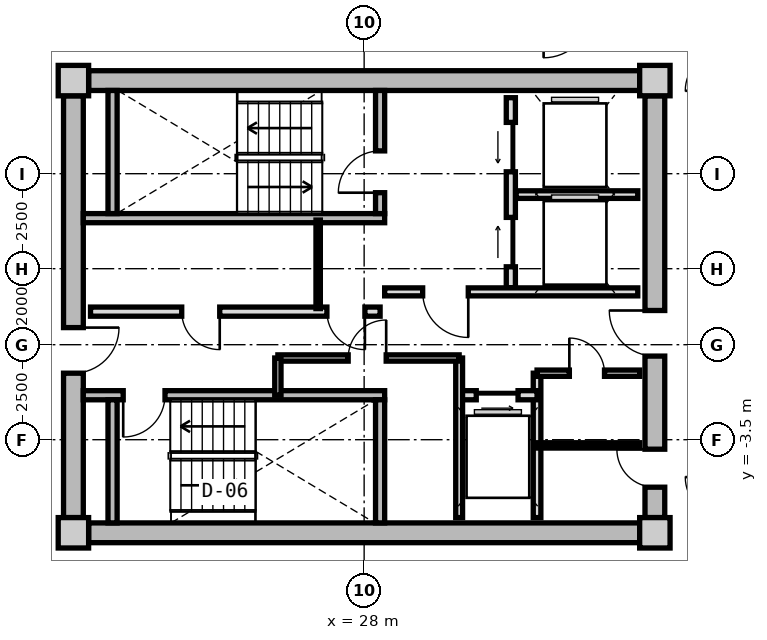
"""IFC4 building model, lengths in metres.
Left out: names, types, materials, properties, quantities, classifications, styles, units other than length and angle.
Written with IfcOpenShell. Run it as: python <this file> out.ifc"""

import sys

from ifc_helpers import new_model, si_unit, direction, frame, frame_2d, origin, origin_2d, place, context, subcontext, project, spatial, rectangle, extrude, source, transform, mapped, element, fill, save


model = new_model("IFC4")
c1 = context("Model", 3, precision=1e-05, world=origin(), true_north=direction((0.0, 1.0)))
c2 = subcontext(c1, "Body", "Model", "MODEL_VIEW")
j1 = project(units=[si_unit("LENGTHUNIT", "METRE"), si_unit("PLANEANGLEUNIT", "RADIAN")], contexts=[c1])
p1 = place(None, origin())
s1 = spatial("IfcSite", under=j1, at=p1, CompositionType="ELEMENT")
p2 = place(p1, origin())
s2 = spatial("IfcBuilding", under=s1, at=p2, CompositionType="ELEMENT")
p3 = place(p2, frame((0.0, 0.0, 207.8)))
s3 = spatial("IfcBuildingStorey", under=s2, at=p3, CompositionType="ELEMENT", Elevation=207.8)
m1 = source(origin(), c2, "Body", "SweptSolid", [
    extrude(rectangle(XDim=0.8, YDim=0.8, at=origin_2d()), origin(), (0.0, 0.0, 1.0), 3.05),
])
for number, where, z_axis, x_axis in (
    (1, (20.35, -5.95, 0.0), (0.0, 0.0, 1.0), (1.0, 0.0, 0.0)),
    (2, (35.65, -5.95, 0.0), (0.0, 0.0, 1.0), (1.0, 0.0, 0.0)),
    (3, (35.65, 5.95, 0.0), (0.0, 0.0, 1.0), (1.0, 0.0, 0.0)),
    (4, (20.35, 5.95, 0.0), (0.0, 0.0, 1.0), (1.0, 0.0, 0.0)),
):
    element("IfcColumn", number, at=place(p3, frame(where, z_axis=z_axis, x_axis=x_axis)), inside=s3, PredefinedType="COLUMN", context=c2, shape_type="MappedRepresentation", body=[
        mapped(m1, transform((0.0, 0.0, 0.0), x_axis=(1.0, 0.0, 0.0), y_axis=(0.0, 1.0, 0.0), z_axis=(0.0, 0.0, 1.0), scale=1.0)),
    ])
m2 = source(origin(), c2, "Body", "SweptSolid", [
    extrude(rectangle(XDim=14.5, YDim=0.52, at=frame_2d((7.25, 0.0))), origin(), (0.0, 0.0, 1.0), 2.76),
])
for number, where, z_axis, x_axis in (
    (5, (20.75, 5.95, 0.0), (0.0, 0.0, 1.0), (1.0, 0.0, 0.0)),
    (6, (35.25, -5.95, 0.0), (0.0, 0.0, 1.0), (-1.0, 0.0, 0.0)),
):
    element("IfcWall", number, at=place(p3, frame(where, z_axis=z_axis, x_axis=x_axis)), inside=s3, PredefinedType="SHEAR", context=c2, shape_type="MappedRepresentation", body=[
        mapped(m2, transform((0.0, 0.0, 0.0), x_axis=(1.0, 0.0, 0.0), y_axis=(0.0, 1.0, 0.0), z_axis=(0.0, 0.0, 1.0), scale=1.0)),
    ])
m3 = source(origin(), c2, "Body", "SweptSolid", [
    extrude(rectangle(XDim=11.1, YDim=0.52, at=frame_2d((5.55, 0.0))), origin(), (0.0, 0.0, 1.0), 2.76),
])
p4 = place(p3, frame((20.35, -5.55, 0.0), z_axis=(0.0, 0.0, 1.0), x_axis=(0.0, 1.0, 0.0)))
e7 = element("IfcWall", 7, at=p4, inside=s3, PredefinedType="SHEAR", context=c2, shape_type="MappedRepresentation", body=[
    mapped(m3, transform((0.0, 0.0, 0.0), x_axis=(1.0, 0.0, 0.0), y_axis=(0.0, 1.0, 0.0), z_axis=(0.0, 0.0, 1.0), scale=1.0)),
])
p5 = place(p4, frame((3.8, 0.0, 0.0)))
e8 = element("IfcOpeningElement", 8, at=p5, cuts=e7, PredefinedType="OPENING", context=c2, shape_type="SweptSolid", body=[
    extrude(rectangle(XDim=1.2, YDim=2.15, at=frame_2d((0.6, 1.075))), frame((0.0, 0.27, 0.0), z_axis=(0.0, -1.0, 0.0), x_axis=(1.0, 0.0, 0.0)), (0.0, 0.0, 1.0), 0.54),
])
p6 = place(p3, frame((35.65, 5.55, 0.0), z_axis=(0.0, 0.0, 1.0), x_axis=(0.0, -1.0, 0.0)))
e9 = element("IfcWall", 9, at=p6, inside=s3, PredefinedType="SHEAR", context=c2, shape_type="MappedRepresentation", body=[
    mapped(m3, transform((0.0, 0.0, 0.0), x_axis=(1.0, 0.0, 0.0), y_axis=(0.0, 1.0, 0.0), z_axis=(0.0, 0.0, 1.0), scale=1.0)),
])
p7 = place(p6, frame((5.65, 0.0, 0.0)))
e10 = element("IfcOpeningElement", 10, at=p7, cuts=e9, PredefinedType="OPENING", context=c2, shape_type="SweptSolid", body=[
    extrude(rectangle(XDim=1.2, YDim=2.15, at=frame_2d((0.6, 1.075))), frame((0.0, 0.27, 0.0), z_axis=(0.0, -1.0, 0.0), x_axis=(1.0, 0.0, 0.0)), (0.0, 0.0, 1.0), 0.54),
])
p8 = place(p6, frame((9.3, 0.0, 0.0)))
e11 = element("IfcOpeningElement", 11, at=p8, cuts=e9, PredefinedType="OPENING", context=c2, shape_type="SweptSolid", body=[
    extrude(rectangle(XDim=1.0, YDim=2.1, at=frame_2d((0.5, 1.05))), frame((0.0, 0.27, 0.0), z_axis=(0.0, -1.0, 0.0), x_axis=(1.0, 0.0, 0.0)), (0.0, 0.0, 1.0), 0.54),
])
m4 = source(origin(), c2, "Body", "SweptSolid", [
    extrude(rectangle(XDim=7.93, YDim=0.24, at=frame_2d((3.965, 0.0))), origin(), (0.0, 0.0, 1.0), 2.76),
])
p9 = place(p3, frame((20.61, 2.33, 0.0), z_axis=(0.0, 0.0, 1.0), x_axis=(1.0, 0.0, 0.0)))
e12 = element("IfcWall", 12, at=p9, inside=s3, PredefinedType="PARTITIONING", context=c2, shape_type="MappedRepresentation", body=[
    mapped(m4, transform((0.0, 0.0, 0.0), x_axis=(1.0, 0.0, 0.0), y_axis=(0.0, 1.0, 0.0), z_axis=(0.0, 0.0, 1.0), scale=1.0)),
])
m5 = source(origin(), c2, "Body", "SweptSolid", [
    extrude(rectangle(XDim=3.24, YDim=0.24, at=frame_2d((1.62, 0.0))), origin(), (0.0, 0.0, 1.0), 2.76),
])
p10 = place(p3, frame((21.38, 2.45, 0.0), z_axis=(0.0, 0.0, 1.0), x_axis=(0.0, 1.0, 0.0)))
e13 = element("IfcWall", 13, at=p10, inside=s3, PredefinedType="PARTITIONING", context=c2, shape_type="MappedRepresentation", body=[
    mapped(m5, transform((0.0, 0.0, 0.0), x_axis=(1.0, 0.0, 0.0), y_axis=(0.0, 1.0, 0.0), z_axis=(0.0, 0.0, 1.0), scale=1.0)),
])
p11 = place(p3, frame((28.42, 2.45, 0.0), z_axis=(0.0, 0.0, 1.0), x_axis=(0.0, 1.0, 0.0)))
e14 = element("IfcWall", 14, at=p11, inside=s3, PredefinedType="PARTITIONING", context=c2, shape_type="MappedRepresentation", body=[
    mapped(m5, transform((0.0, 0.0, 0.0), x_axis=(1.0, 0.0, 0.0), y_axis=(0.0, 1.0, 0.0), z_axis=(0.0, 0.0, 1.0), scale=1.0)),
])
p12 = place(p11, frame((0.55, 0.0, 0.0)))
e15 = element("IfcOpeningElement", 15, at=p12, cuts=e14, PredefinedType="OPENING", context=c2, shape_type="SweptSolid", body=[
    extrude(rectangle(XDim=1.1, YDim=2.15, at=frame_2d((0.55, 1.075))), frame((0.0, 0.13, 0.0), z_axis=(0.0, -1.0, 0.0), x_axis=(1.0, 0.0, 0.0)), (0.0, 0.0, 1.0), 0.26),
])
p13 = place(p3, frame((20.61, -2.33, 0.0), z_axis=(0.0, 0.0, 1.0), x_axis=(1.0, 0.0, 0.0)))
e16 = element("IfcWall", 16, at=p13, inside=s3, PredefinedType="PARTITIONING", context=c2, shape_type="MappedRepresentation", body=[
    mapped(m4, transform((0.0, 0.0, 0.0), x_axis=(1.0, 0.0, 0.0), y_axis=(0.0, 1.0, 0.0), z_axis=(0.0, 0.0, 1.0), scale=1.0)),
])
p14 = place(p13, frame((1.05, 0.0, 0.0)))
e17 = element("IfcOpeningElement", 17, at=p14, cuts=e16, PredefinedType="OPENING", context=c2, shape_type="SweptSolid", body=[
    extrude(rectangle(XDim=1.1, YDim=2.15, at=frame_2d((0.55, 1.075))), frame((0.0, 0.13, 0.0), z_axis=(0.0, -1.0, 0.0), x_axis=(1.0, 0.0, 0.0)), (0.0, 0.0, 1.0), 0.26),
])
for number, where, z_axis, x_axis in (
    (18, (21.38, -5.69, 0.0), (0.0, 0.0, 1.0), (0.0, 1.0, 0.0)),
    (19, (28.42, -5.69, 0.0), (0.0, 0.0, 1.0), (0.0, 1.0, 0.0)),
):
    element("IfcWall", number, at=place(p3, frame(where, z_axis=z_axis, x_axis=x_axis)), inside=s3, PredefinedType="PARTITIONING", context=c2, shape_type="MappedRepresentation", body=[
        mapped(m5, transform((0.0, 0.0, 0.0), x_axis=(1.0, 0.0, 0.0), y_axis=(0.0, 1.0, 0.0), z_axis=(0.0, 0.0, 1.0), scale=1.0)),
    ])
m6 = source(origin(), c2, "Body", "SweptSolid", [
    extrude(rectangle(XDim=5.0, YDim=0.24, at=frame_2d((2.5, 0.0))), origin(), (0.0, 0.0, 1.0), 2.745),
])
p15 = place(p3, frame((31.86, 0.5, 0.0), z_axis=(0.0, 0.0, 1.0), x_axis=(0.0, 1.0, 0.0)))
e20 = element("IfcWall", 20, at=p15, inside=s3, PredefinedType="PARTITIONING", context=c2, shape_type="MappedRepresentation", body=[
    mapped(m6, transform((0.0, 0.0, 0.0), x_axis=(1.0, 0.0, 0.0), y_axis=(0.0, 1.0, 0.0), z_axis=(0.0, 0.0, 1.0), scale=1.0)),
])
p16 = place(p15, frame((3.05, 0.0, 0.0)))
e21 = element("IfcOpeningElement", 21, at=p16, cuts=e20, PredefinedType="OPENING", context=c2, shape_type="SweptSolid", body=[
    extrude(rectangle(XDim=1.3, YDim=2.2, at=frame_2d((0.65, 1.1))), frame((0.0, 0.13, 0.0), z_axis=(0.0, -1.0, 0.0), x_axis=(1.0, 0.0, 0.0)), (0.0, 0.0, 1.0), 0.26),
])
p17 = place(p15, frame((0.55, 0.0, 0.0)))
e22 = element("IfcOpeningElement", 22, at=p17, cuts=e20, PredefinedType="OPENING", context=c2, shape_type="SweptSolid", body=[
    extrude(rectangle(XDim=1.3, YDim=2.2, at=frame_2d((0.65, 1.1))), frame((0.0, 0.13, 0.0), z_axis=(0.0, -1.0, 0.0), x_axis=(1.0, 0.0, 0.0)), (0.0, 0.0, 1.0), 0.26),
])
m7 = source(origin(), c2, "Body", "SweptSolid", [
    extrude(rectangle(XDim=3.2, YDim=0.2, at=frame_2d((1.6, 0.0))), origin(), (0.0, 0.0, 1.0), 2.745),
])
p18 = place(p3, frame((32.0, 2.95, 0.0), z_axis=(0.0, 0.0, 1.0), x_axis=(1.0, 0.0, 0.0)))
e23 = element("IfcWall", 23, at=p18, inside=s3, PredefinedType="PARTITIONING", context=c2, shape_type="MappedRepresentation", body=[
    mapped(m7, transform((0.0, 0.0, 0.0), x_axis=(1.0, 0.0, 0.0), y_axis=(0.0, 1.0, 0.0), z_axis=(0.0, 0.0, 1.0), scale=1.0)),
])
m8 = source(origin(), c2, "Body", "SweptSolid", [
    extrude(rectangle(XDim=6.66, YDim=0.21, at=frame_2d((3.33, 0.0))), origin(), (0.0, 0.0, 1.0), 2.745),
])
p19 = place(p3, frame((28.54, 0.39, 0.0), z_axis=(0.0, 0.0, 1.0), x_axis=(1.0, 0.0, 0.0)))
e24 = element("IfcWall", 24, at=p19, inside=s3, PredefinedType="PARTITIONING", context=c2, shape_type="MappedRepresentation", body=[
    mapped(m8, transform((0.0, 0.0, 0.0), x_axis=(1.0, 0.0, 0.0), y_axis=(0.0, 1.0, 0.0), z_axis=(0.0, 0.0, 1.0), scale=1.0)),
])
p20 = place(p19, frame((1.0, 0.0, 0.0)))
e25 = element("IfcOpeningElement", 25, at=p20, cuts=e24, PredefinedType="OPENING", context=c2, shape_type="SweptSolid", body=[
    extrude(rectangle(XDim=1.2, YDim=2.15, at=frame_2d((0.6, 1.075))), frame((0.0, 0.115, 0.0), z_axis=(0.0, -1.0, 0.0), x_axis=(1.0, 0.0, 0.0)), (0.0, 0.0, 1.0), 0.23),
])
m9 = source(origin(), c2, "Body", "SweptSolid", [
    extrude(rectangle(XDim=7.62, YDim=0.24, at=frame_2d((3.81, 0.0))), origin(), (0.0, 0.0, 1.0), 2.745),
])
p21 = place(p3, frame((20.8, -0.13, 0.0), z_axis=(0.0, 0.0, 1.0), x_axis=(1.0, 0.0, 0.0)))
e26 = element("IfcWall", 26, at=p21, inside=s3, PredefinedType="PARTITIONING", context=c2, shape_type="MappedRepresentation", body=[
    mapped(m9, transform((0.0, 0.0, 0.0), x_axis=(1.0, 0.0, 0.0), y_axis=(0.0, 1.0, 0.0), z_axis=(0.0, 0.0, 1.0), scale=1.0)),
])
p22 = place(p21, frame((6.22, 0.0, 0.0)))
e27 = element("IfcOpeningElement", 27, at=p22, cuts=e26, PredefinedType="OPENING", context=c2, shape_type="SweptSolid", body=[
    extrude(rectangle(XDim=1.0, YDim=2.1, at=frame_2d((0.5, 1.05))), frame((0.0, 0.13, 0.0), z_axis=(0.0, -1.0, 0.0), x_axis=(1.0, 0.0, 0.0)), (0.0, 0.0, 1.0), 0.26),
])
p23 = place(p21, frame((2.4, 0.0, 0.0)))
e28 = element("IfcOpeningElement", 28, at=p23, cuts=e26, PredefinedType="OPENING", context=c2, shape_type="SweptSolid", body=[
    extrude(rectangle(XDim=1.0, YDim=2.1, at=frame_2d((0.5, 1.05))), frame((0.0, 0.13, 0.0), z_axis=(0.0, -1.0, 0.0), x_axis=(1.0, 0.0, 0.0)), (0.0, 0.0, 1.0), 0.26),
])
m10 = source(origin(), c2, "Body", "SweptSolid", [
    extrude(rectangle(XDim=2.33, YDim=0.115, at=frame_2d((1.165, 0.0))), origin(), (0.0, 0.0, 1.0), 2.745),
])
p24 = place(p3, frame((26.79, -0.05, 0.0), z_axis=(0.0, 0.0, 1.0), x_axis=(0.0, 1.0, 0.0)))
e29 = element("IfcWall", 29, at=p24, inside=s3, PredefinedType="PARTITIONING", context=c2, shape_type="MappedRepresentation", body=[
    mapped(m10, transform((0.0, 0.0, 0.0), x_axis=(1.0, 0.0, 0.0), y_axis=(0.0, 1.0, 0.0), z_axis=(0.0, 0.0, 1.0), scale=1.0)),
])
m11 = source(origin(), c2, "Body", "SweptSolid", [
    extrude(rectangle(XDim=3.8, YDim=0.2, at=frame_2d((1.9, 0.0))), origin(), (0.0, 0.0, 1.0), 2.745),
])
p25 = place(p3, frame((32.55, -5.55, 0.0), z_axis=(0.0, 0.0, 1.0), x_axis=(0.0, 1.0, 0.0)))
e30 = element("IfcWall", 30, at=p25, inside=s3, PredefinedType="PARTITIONING", context=c2, shape_type="MappedRepresentation", body=[
    mapped(m11, transform((0.0, 0.0, 0.0), x_axis=(1.0, 0.0, 0.0), y_axis=(0.0, 1.0, 0.0), z_axis=(0.0, 0.0, 1.0), scale=1.0)),
])
m12 = source(origin(), c2, "Body", "SweptSolid", [
    extrude(rectangle(XDim=2.05, YDim=0.24, at=frame_2d((1.025, 0.0))), origin(), (0.0, 0.0, 1.0), 2.745),
])
p26 = place(p3, frame((30.5, -2.33, 0.0), z_axis=(0.0, 0.0, 1.0), x_axis=(1.0, 0.0, 0.0)))
e31 = element("IfcWall", 31, at=p26, inside=s3, PredefinedType="PARTITIONING", context=c2, shape_type="MappedRepresentation", body=[
    mapped(m12, transform((0.0, 0.0, 0.0), x_axis=(1.0, 0.0, 0.0), y_axis=(0.0, 1.0, 0.0), z_axis=(0.0, 0.0, 1.0), scale=1.0)),
])
p27 = place(p26, frame((0.45, 0.0, 0.0)))
e32 = element("IfcOpeningElement", 32, at=p27, cuts=e31, PredefinedType="OPENING", context=c2, shape_type="SweptSolid", body=[
    extrude(rectangle(XDim=1.1, YDim=2.2, at=frame_2d((0.55, 1.1))), frame((0.0, 0.13, 0.0), z_axis=(0.0, -1.0, 0.0), x_axis=(1.0, 0.0, 0.0)), (0.0, 0.0, 1.0), 0.26),
])
m13 = source(origin(), c2, "Body", "SweptSolid", [
    extrude(rectangle(XDim=4.2, YDim=0.18, at=frame_2d((2.1, 0.0))), origin(), (0.0, 0.0, 1.0), 2.745),
])
p28 = place(p3, frame((30.5, -5.55, 0.0), z_axis=(0.0, 0.0, 1.0), x_axis=(0.0, 1.0, 0.0)))
e33 = element("IfcWall", 33, at=p28, inside=s3, PredefinedType="PARTITIONING", context=c2, shape_type="MappedRepresentation", body=[
    mapped(m13, transform((0.0, 0.0, 0.0), x_axis=(1.0, 0.0, 0.0), y_axis=(0.0, 1.0, 0.0), z_axis=(0.0, 0.0, 1.0), scale=1.0)),
])
m14 = source(origin(), c2, "Body", "SweptSolid", [
    extrude(rectangle(XDim=4.77, YDim=0.165, at=frame_2d((2.385, 0.0))), origin(), (0.0, 0.0, 1.0), 2.745),
])
p29 = place(p3, frame((25.73, -1.35, 0.0), z_axis=(0.0, 0.0, 1.0), x_axis=(1.0, 0.0, 0.0)))
e34 = element("IfcWall", 34, at=p29, inside=s3, PredefinedType="PARTITIONING", context=c2, shape_type="MappedRepresentation", body=[
    mapped(m14, transform((0.0, 0.0, 0.0), x_axis=(1.0, 0.0, 0.0), y_axis=(0.0, 1.0, 0.0), z_axis=(0.0, 0.0, 1.0), scale=1.0)),
])
p30 = place(p29, frame((1.85, 0.0, 0.0)))
e35 = element("IfcOpeningElement", 35, at=p30, cuts=e34, PredefinedType="OPENING", context=c2, shape_type="SweptSolid", body=[
    extrude(rectangle(XDim=1.0, YDim=2.1, at=frame_2d((0.5, 1.05))), frame((0.0, 0.093, 0.0), z_axis=(0.0, -1.0, 0.0), x_axis=(1.0, 0.0, 0.0)), (0.0, 0.0, 1.0), 0.185),
])
m15 = source(origin(), c2, "Body", "SweptSolid", [
    extrude(rectangle(XDim=0.98, YDim=0.165, at=frame_2d((0.49, 0.0))), origin(), (0.0, 0.0, 1.0), 2.745),
])
p31 = place(p3, frame((25.73, -2.33, 0.0), z_axis=(0.0, 0.0, 1.0), x_axis=(0.0, 1.0, 0.0)))
e36 = element("IfcWall", 36, at=p31, inside=s3, PredefinedType="PARTITIONING", context=c2, shape_type="MappedRepresentation", body=[
    mapped(m15, transform((0.0, 0.0, 0.0), x_axis=(1.0, 0.0, 0.0), y_axis=(0.0, 1.0, 0.0), z_axis=(0.0, 0.0, 1.0), scale=1.0)),
])
m16 = source(origin(), c2, "Body", "SweptSolid", [
    extrude(rectangle(XDim=2.7, YDim=0.165, at=frame_2d((1.35, 0.0))), origin(), (0.0, 0.0, 1.0), 2.745),
])
p32 = place(p3, frame((32.55, -1.75, 0.0), z_axis=(0.0, 0.0, 1.0), x_axis=(1.0, 0.0, 0.0)))
e37 = element("IfcWall", 37, at=p32, inside=s3, PredefinedType="PARTITIONING", context=c2, shape_type="MappedRepresentation", body=[
    mapped(m16, transform((0.0, 0.0, 0.0), x_axis=(1.0, 0.0, 0.0), y_axis=(0.0, 1.0, 0.0), z_axis=(0.0, 0.0, 1.0), scale=1.0)),
])
p33 = place(p32, frame((0.85, 0.0, 0.0)))
e38 = element("IfcOpeningElement", 38, at=p33, cuts=e37, PredefinedType="OPENING", context=c2, shape_type="SweptSolid", body=[
    extrude(rectangle(XDim=0.925, YDim=2.1, at=frame_2d((0.462, 1.05))), frame((0.0, 0.093, 0.0), z_axis=(0.0, -1.0, 0.0), x_axis=(1.0, 0.0, 0.0)), (0.0, 0.0, 1.0), 0.185),
])
m17 = source(origin(), c2, "Body", "SweptSolid", [
    extrude(rectangle(XDim=2.7, YDim=0.14, at=frame_2d((1.35, 0.0))), origin(), (0.0, 0.0, 1.0), 2.745),
])
p34 = place(p3, frame((32.55, -3.65, 0.0), z_axis=(0.0, 0.0, 1.0), x_axis=(1.0, 0.0, 0.0)))
e39 = element("IfcWall", 39, at=p34, inside=s3, PredefinedType="PARTITIONING", context=c2, shape_type="MappedRepresentation", body=[
    mapped(m17, transform((0.0, 0.0, 0.0), x_axis=(1.0, 0.0, 0.0), y_axis=(0.0, 1.0, 0.0), z_axis=(0.0, 0.0, 1.0), scale=1.0)),
])
m18 = source(origin(), c2, "Body", "SweptSolid", [
    extrude(rectangle(XDim=1.1, YDim=2.15, at=frame_2d((0.55, 1.075))), frame((0.0, 0.025, 0.0), z_axis=(0.0, -1.0, 0.0), x_axis=(1.0, 0.0, 0.0)), (0.0, 0.0, 1.0), 0.05),
])
p35 = place(p12, origin())
e40 = element("IfcDoor", 40, at=p35, inside=s3, OperationType="SINGLE_SWING_LEFT", PredefinedType="DOOR", context=c2, shape_type="MappedRepresentation", body=[
    mapped(m18, transform((0.0, 0.0, 0.0), x_axis=(1.0, 0.0, 0.0), y_axis=(0.0, 1.0, 0.0), z_axis=(0.0, 0.0, 1.0), scale=1.0)),
])
fill(e15, e40)
p36 = place(p14, frame((1.1, 0.0, 0.0), z_axis=(0.0, 0.0, 1.0), x_axis=(-1.0, 0.0, 0.0)))
e41 = element("IfcDoor", 41, at=p36, inside=s3, OperationType="SINGLE_SWING_RIGHT", PredefinedType="DOOR", context=c2, shape_type="MappedRepresentation", body=[
    mapped(m18, transform((0.0, 0.0, 0.0), x_axis=(1.0, 0.0, 0.0), y_axis=(0.0, 1.0, 0.0), z_axis=(0.0, 0.0, 1.0), scale=1.0)),
])
fill(e17, e41)
m19 = source(origin(), c2, "Body", "SweptSolid", [
    extrude(rectangle(XDim=1.3, YDim=2.2, at=frame_2d((0.65, 1.1))), frame((0.0, 0.025, 0.0), z_axis=(0.0, -1.0, 0.0), x_axis=(1.0, 0.0, 0.0)), (0.0, 0.0, 1.0), 0.05),
])
p37 = place(p16, origin())
e42 = element("IfcDoor", 42, at=p37, inside=s3, OperationType="SLIDING_TO_LEFT", PredefinedType="DOOR", context=c2, shape_type="MappedRepresentation", body=[
    mapped(m19, transform((0.0, 0.0, 0.0), x_axis=(1.0, 0.0, 0.0), y_axis=(0.0, 1.0, 0.0), z_axis=(0.0, 0.0, 1.0), scale=1.0)),
])
fill(e21, e42)
p38 = place(p17, origin())
e43 = element("IfcDoor", 43, at=p38, inside=s3, OperationType="SLIDING_TO_RIGHT", PredefinedType="DOOR", context=c2, shape_type="MappedRepresentation", body=[
    mapped(m19, transform((0.0, 0.0, 0.0), x_axis=(1.0, 0.0, 0.0), y_axis=(0.0, 1.0, 0.0), z_axis=(0.0, 0.0, 1.0), scale=1.0)),
])
fill(e22, e43)
m20 = source(origin(), c2, "Body", "SweptSolid", [
    extrude(rectangle(XDim=1.2, YDim=2.15, at=frame_2d((0.6, 1.075))), frame((0.0, 0.025, 0.0), z_axis=(0.0, -1.0, 0.0), x_axis=(1.0, 0.0, 0.0)), (0.0, 0.0, 1.0), 0.05),
])
p39 = place(p20, frame((1.2, 0.0, 0.0), z_axis=(0.0, 0.0, 1.0), x_axis=(-1.0, 0.0, 0.0)))
e44 = element("IfcDoor", 44, at=p39, inside=s3, OperationType="SINGLE_SWING_LEFT", PredefinedType="DOOR", context=c2, shape_type="MappedRepresentation", body=[
    mapped(m20, transform((0.0, 0.0, 0.0), x_axis=(1.0, 0.0, 0.0), y_axis=(0.0, 1.0, 0.0), z_axis=(0.0, 0.0, 1.0), scale=1.0)),
])
fill(e25, e44)
p40 = place(p5, frame((1.2, 0.0, 0.0), z_axis=(0.0, 0.0, 1.0), x_axis=(-1.0, 0.0, 0.0)))
e45 = element("IfcDoor", 45, at=p40, inside=s3, OperationType="SINGLE_SWING_LEFT", PredefinedType="DOOR", context=c2, shape_type="MappedRepresentation", body=[
    mapped(m20, transform((0.0, 0.0, 0.0), x_axis=(1.0, 0.0, 0.0), y_axis=(0.0, 1.0, 0.0), z_axis=(0.0, 0.0, 1.0), scale=1.0)),
])
fill(e8, e45)
p41 = place(p7, frame((1.2, 0.0, 0.0), z_axis=(0.0, 0.0, 1.0), x_axis=(-1.0, 0.0, 0.0)))
e46 = element("IfcDoor", 46, at=p41, inside=s3, OperationType="SINGLE_SWING_RIGHT", PredefinedType="DOOR", context=c2, shape_type="MappedRepresentation", body=[
    mapped(m20, transform((0.0, 0.0, 0.0), x_axis=(1.0, 0.0, 0.0), y_axis=(0.0, 1.0, 0.0), z_axis=(0.0, 0.0, 1.0), scale=1.0)),
])
fill(e10, e46)
m21 = source(origin(), c2, "Body", "SweptSolid", [
    extrude(rectangle(XDim=1.0, YDim=2.1, at=frame_2d((0.5, 1.05))), frame((0.0, 0.025, 0.0), z_axis=(0.0, -1.0, 0.0), x_axis=(1.0, 0.0, 0.0)), (0.0, 0.0, 1.0), 0.05),
])
p42 = place(p22, frame((1.0, 0.0, 0.0), z_axis=(0.0, 0.0, 1.0), x_axis=(-1.0, 0.0, 0.0)))
e47 = element("IfcDoor", 47, at=p42, inside=s3, OperationType="SINGLE_SWING_LEFT", PredefinedType="DOOR", context=c2, shape_type="MappedRepresentation", body=[
    mapped(m21, transform((0.0, 0.0, 0.0), x_axis=(1.0, 0.0, 0.0), y_axis=(0.0, 1.0, 0.0), z_axis=(0.0, 0.0, 1.0), scale=1.0)),
])
fill(e27, e47)
p43 = place(p23, frame((1.0, 0.0, 0.0), z_axis=(0.0, 0.0, 1.0), x_axis=(-1.0, 0.0, 0.0)))
e48 = element("IfcDoor", 48, at=p43, inside=s3, OperationType="SINGLE_SWING_LEFT", PredefinedType="DOOR", context=c2, shape_type="MappedRepresentation", body=[
    mapped(m21, transform((0.0, 0.0, 0.0), x_axis=(1.0, 0.0, 0.0), y_axis=(0.0, 1.0, 0.0), z_axis=(0.0, 0.0, 1.0), scale=1.0)),
])
fill(e28, e48)
m22 = source(origin(), c2, "Body", "SweptSolid", [
    extrude(rectangle(XDim=1.1, YDim=2.2, at=frame_2d((0.55, 1.1))), frame((0.0, 0.025, 0.0), z_axis=(0.0, -1.0, 0.0), x_axis=(1.0, 0.0, 0.0)), (0.0, 0.0, 1.0), 0.05),
])
p44 = place(p27, frame((1.1, 0.0, 0.0), z_axis=(0.0, 0.0, 1.0), x_axis=(-1.0, 0.0, 0.0)))
e49 = element("IfcDoor", 49, at=p44, inside=s3, OperationType="SLIDING_TO_RIGHT", PredefinedType="DOOR", context=c2, shape_type="MappedRepresentation", body=[
    mapped(m22, transform((0.0, 0.0, 0.0), x_axis=(1.0, 0.0, 0.0), y_axis=(0.0, 1.0, 0.0), z_axis=(0.0, 0.0, 1.0), scale=1.0)),
])
fill(e32, e49)
p45 = place(p30, origin())
e50 = element("IfcDoor", 50, at=p45, inside=s3, OperationType="SINGLE_SWING_RIGHT", PredefinedType="DOOR", context=c2, shape_type="MappedRepresentation", body=[
    mapped(m21, transform((0.0, 0.0, 0.0), x_axis=(1.0, 0.0, 0.0), y_axis=(0.0, 1.0, 0.0), z_axis=(0.0, 0.0, 1.0), scale=1.0)),
])
fill(e35, e50)
m23 = source(origin(), c2, "Body", "SweptSolid", [
    extrude(rectangle(XDim=0.925, YDim=2.1, at=frame_2d((0.462, 1.05))), frame((0.0, 0.025, 0.0), z_axis=(0.0, -1.0, 0.0), x_axis=(1.0, 0.0, 0.0)), (0.0, 0.0, 1.0), 0.05),
])
p46 = place(p33, origin())
e51 = element("IfcDoor", 51, at=p46, inside=s3, OperationType="SINGLE_SWING_LEFT", PredefinedType="DOOR", context=c2, shape_type="MappedRepresentation", body=[
    mapped(m23, transform((0.0, 0.0, 0.0), x_axis=(1.0, 0.0, 0.0), y_axis=(0.0, 1.0, 0.0), z_axis=(0.0, 0.0, 1.0), scale=1.0)),
])
fill(e38, e51)
p47 = place(p8, frame((1.0, 0.0, 0.0), z_axis=(0.0, 0.0, 1.0), x_axis=(-1.0, 0.0, 0.0)))
e52 = element("IfcDoor", 52, at=p47, inside=s3, OperationType="SINGLE_SWING_RIGHT", PredefinedType="DOOR", context=c2, shape_type="MappedRepresentation", body=[
    mapped(m21, transform((0.0, 0.0, 0.0), x_axis=(1.0, 0.0, 0.0), y_axis=(0.0, 1.0, 0.0), z_axis=(0.0, 0.0, 1.0), scale=1.0)),
])
fill(e11, e52)
save(model, sys.argv[1])
